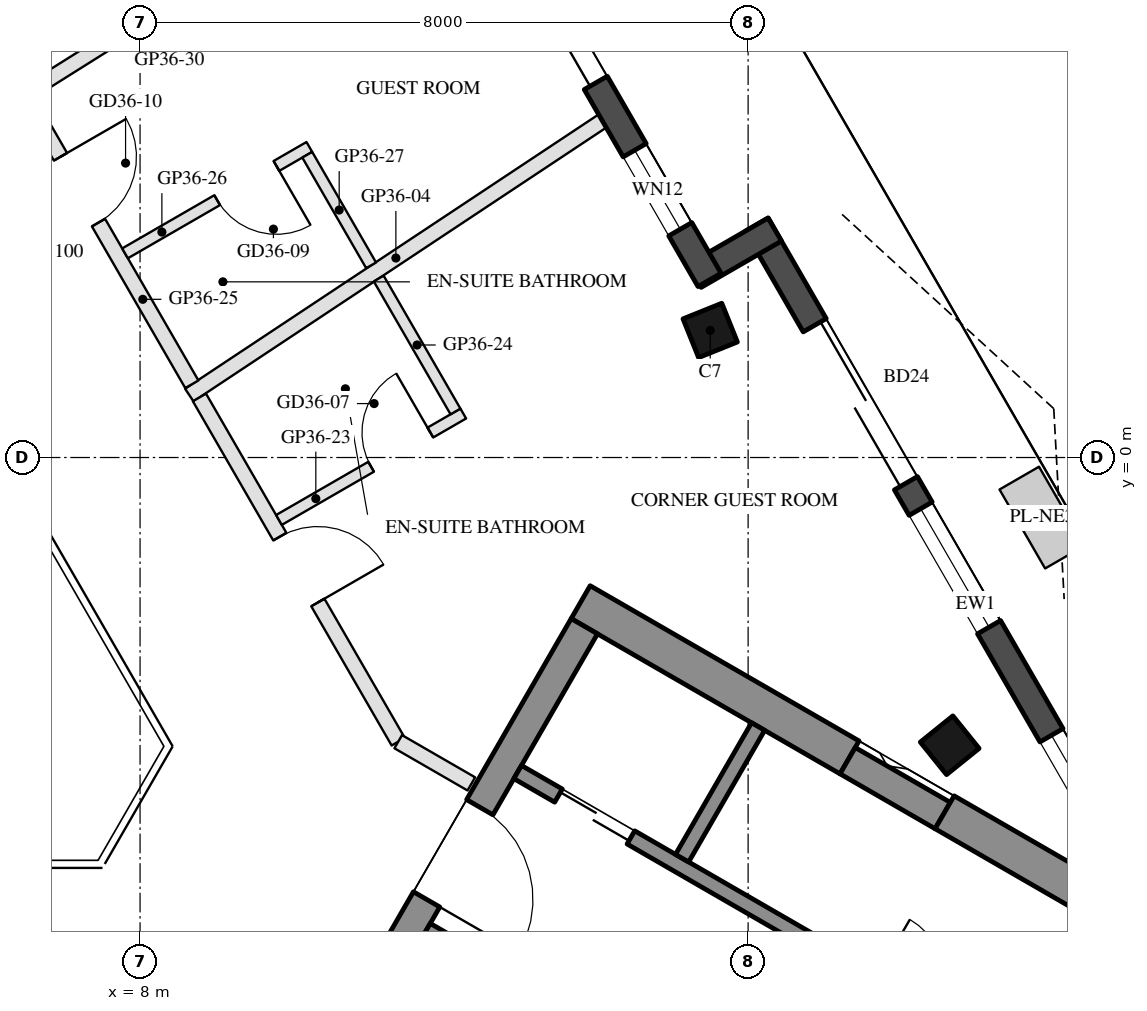
"""IFC4 building model, lengths in metres.
Left out: names, types, materials, properties, quantities, classifications, styles, units other than length and angle.
Written with IfcOpenShell. Run it as: python <this file> out.ifc"""

import sys

from ifc_helpers import new_model, si_unit, direction, frame, frame_2d, origin, origin_2d, place, context, subcontext, project, spatial, rectangle, hollow_rectangle, extrude, boolean, halfspace, element, fill, save


model = new_model("IFC4")
c1 = context("Model", 3, precision=1e-05, world=origin(), true_north=direction((0.0, 1.0)))
c2 = subcontext(c1, "Body", "Model", "MODEL_VIEW")
j1 = project(units=[si_unit("LENGTHUNIT", "METRE"), si_unit("PLANEANGLEUNIT", "RADIAN")], contexts=[c1])
p1 = place(None, origin())
s1 = spatial("IfcSite", under=j1, at=p1, CompositionType="ELEMENT")
p2 = place(p1, origin())
s2 = spatial("IfcBuilding", under=s1, at=p2, CompositionType="ELEMENT")
p3 = place(p2, frame((0.0, 0.0, 328.1)))
s3 = spatial("IfcBuildingStorey", under=s2, at=p3, CompositionType="ELEMENT", Elevation=328.1)
p4 = place(p3, frame((18.652, -3.786, 0.0), z_axis=(-0.190735837279, 0.02958801006, 0.981195388309), x_axis=(0.488607938484, -0.864067297741, 0.121037132421)))
e1 = element("IfcColumn", 1, at=p4, inside=s3, PredefinedType="COLUMN", context=c2, shape_type="SweptSolid", body=[
    boolean("DIFFERENCE", boolean("DIFFERENCE", extrude(hollow_rectangle(XDim=0.55, YDim=0.55, WallThickness=0.025, at=origin_2d()), origin(), (0.0, 0.0, 1.0), 3.771), halfspace(frame((0.0, 0.0, 0.04), z_axis=(0.0, 0.0, 1.0), x_axis=(1.0, 0.0, 0.0)), True)), halfspace(frame((0.0, 0.0, 3.753), z_axis=(0.0, 0.0, 1.0), x_axis=(1.0, 0.0, 0.0)), False)),
])
p5 = place(p3, frame((15.501, 1.672, 0.0), z_axis=(-0.161451925123, -0.022915757114, 0.986614485982), x_axis=(0.495072298274, -0.866715969634, 0.060883885081)))
e2 = element("IfcColumn", 2, at=p5, inside=s3, PredefinedType="COLUMN", context=c2, shape_type="SweptSolid", body=[
    boolean("DIFFERENCE", boolean("DIFFERENCE", extrude(hollow_rectangle(XDim=0.55, YDim=0.55, WallThickness=0.025, at=origin_2d()), origin(), (0.0, 0.0, 1.0), 3.75), halfspace(frame((0.0, 0.0, 0.034), z_axis=(0.0, 0.0, 1.0), x_axis=(1.0, 0.0, 0.0)), True)), halfspace(frame((0.0, 0.0, 3.735), z_axis=(0.0, 0.0, 1.0), x_axis=(1.0, 0.0, 0.0)), False)),
])
p6 = place(p3, frame((20.916, -5.257, 0.0), z_axis=(0.0, 0.0, 1.0), x_axis=(-0.500022310942, 0.866012522173, 0.0)))
e3 = element("IfcWall", 3, at=p6, inside=s3, PredefinedType="SOLIDWALL", context=c2, shape_type="SweptSolid", body=[
    extrude(rectangle(XDim=9.608, YDim=0.35, at=frame_2d((4.804, 0.0))), origin(), (0.0, 0.0, 1.0), 3.45),
])
p7 = place(p6, frame((0.45, 0.0, 0.3)))
e4 = element("IfcOpeningElement", 4, at=p7, cuts=e3, PredefinedType="OPENING", context=c2, shape_type="SweptSolid", body=[
    extrude(rectangle(XDim=1.4, YDim=2.65, at=frame_2d((0.7, 1.325))), frame((0.0, 0.185, 0.0), z_axis=(0.0, -1.0, 0.0), x_axis=(1.0, 0.0, 0.0)), (0.0, 0.0, 1.0), 0.37),
])
p8 = place(p6, frame((5.68, 0.0, 0.0)))
e5 = element("IfcOpeningElement", 5, at=p8, cuts=e3, PredefinedType="OPENING", context=c2, shape_type="SweptSolid", body=[
    extrude(rectangle(XDim=2.4, YDim=2.4, at=frame_2d((1.2, 1.2))), frame((0.0, 0.185, 0.0), z_axis=(0.0, -1.0, 0.0), x_axis=(1.0, 0.0, 0.0)), (0.0, 0.0, 1.0), 0.37),
])
p9 = place(p6, frame((3.492, 0.0, 0.3)))
e6 = element("IfcOpeningElement", 6, at=p9, cuts=e3, PredefinedType="OPENING", context=c2, shape_type="SweptSolid", body=[
    extrude(rectangle(XDim=1.8, YDim=2.65, at=frame_2d((0.9, 1.325))), frame((0.0, 0.185, 0.0), z_axis=(0.0, -1.0, 0.0), x_axis=(1.0, 0.0, 0.0)), (0.0, 0.0, 1.0), 0.37),
])
p10 = place(p3, frame((16.351, 3.0, 0.0), z_axis=(0.0, 0.0, 1.0), x_axis=(-0.866005645448, -0.500034220881, 0.0)))
e7 = element("IfcWall", 7, at=p10, inside=s3, PredefinedType="SOLIDWALL", context=c2, shape_type="SweptSolid", body=[
    extrude(rectangle(XDim=1.22, YDim=0.35, at=frame_2d((0.61, 0.0))), origin(), (0.0, 0.0, 1.0), 3.45),
])
p11 = place(p3, frame((15.492, 2.337, 0.0), z_axis=(0.0, 0.0, 1.0), x_axis=(-0.499999159329, 0.866025889145, 0.0)))
e8 = element("IfcWall", 8, at=p11, inside=s3, PredefinedType="SOLIDWALL", context=c2, shape_type="SweptSolid", body=[
    extrude(rectangle(XDim=5.143, YDim=0.35, at=frame_2d((2.571, 0.0))), origin(), (0.0, 0.0, 1.0), 3.45),
])
p12 = place(p11, frame((0.77, 0.0, 0.3)))
e9 = element("IfcOpeningElement", 9, at=p12, cuts=e8, PredefinedType="OPENING", context=c2, shape_type="SweptSolid", body=[
    extrude(rectangle(XDim=1.2, YDim=2.65, at=frame_2d((0.6, 1.325))), frame((0.0, 0.185, 0.0), z_axis=(0.0, -1.0, 0.0), x_axis=(1.0, 0.0, 0.0)), (0.0, 0.0, 1.0), 0.37),
])
p13 = place(p11, frame((2.993, 0.0, 0.0)))
e10 = element("IfcOpeningElement", 10, at=p13, cuts=e8, PredefinedType="OPENING", context=c2, shape_type="SweptSolid", body=[
    extrude(rectangle(XDim=1.8, YDim=2.4, at=frame_2d((0.9, 1.2))), frame((0.0, 0.185, 0.0), z_axis=(0.0, -1.0, 0.0), x_axis=(1.0, 0.0, 0.0)), (0.0, 0.0, 1.0), 0.37),
])
p14 = place(p3, frame((13.797, -1.903, 0.0), z_axis=(0.0, 0.0, 1.0), x_axis=(0.866020367552, -0.500008722908, 0.0)))
e11 = element("IfcWall", 11, at=p14, inside=s3, PredefinedType="SHEAR", context=c2, shape_type="SweptSolid", body=[
    extrude(rectangle(XDim=4.085, YDim=0.5, at=frame_2d((2.042, 0.0))), origin(), (0.0, 0.0, 1.0), 3.45),
])
p15 = place(p3, frame((17.309, -3.989, 0.0), z_axis=(0.0, 0.0, 1.0), x_axis=(0.866092727722, -0.499883373386, 0.0)))
e12 = element("IfcWall", 12, at=p15, inside=s3, PredefinedType="SHEAR", context=c2, shape_type="SweptSolid", body=[
    extrude(rectangle(XDim=1.445, YDim=0.4, at=frame_2d((0.722, 0.0))), origin(), (0.0, 0.0, 1.0), 3.45),
])
p16 = place(p3, frame((18.585, -4.668, 0.0), z_axis=(0.0, 0.0, 1.0), x_axis=(0.866034122891, -0.49998489776, 0.0)))
e13 = element("IfcWall", 13, at=p16, inside=s3, PredefinedType="SHEAR", context=c2, shape_type="SweptSolid", body=[
    extrude(rectangle(XDim=2.738, YDim=0.5, at=frame_2d((1.369, 0.0))), origin(), (0.0, 0.0, 1.0), 3.45),
])
p17 = place(p3, frame((8.845, -10.88, 0.0), z_axis=(0.0, 0.0, 1.0), x_axis=(0.500004234368, 0.866022959057, 0.0)))
e14 = element("IfcWall", 14, at=p17, inside=s3, PredefinedType="SHEAR", context=c2, shape_type="SweptSolid", body=[
    extrude(rectangle(XDim=10.0, YDim=0.4, at=frame_2d((5.0, 0.0))), origin(), (0.0, 0.0, 1.0), 3.45),
])
p18 = place(p17, frame((3.55, 0.0, 0.0)))
e15 = element("IfcOpeningElement", 15, at=p18, cuts=e14, PredefinedType="OPENING", context=c2, shape_type="SweptSolid", body=[
    extrude(rectangle(XDim=1.1, YDim=2.1, at=frame_2d((0.55, 1.05))), frame((0.0, 0.21, 0.0), z_axis=(0.0, -1.0, 0.0), x_axis=(1.0, 0.0, 0.0)), (0.0, 0.0, 1.0), 0.42),
])
p19 = place(p17, frame((5.85, 0.0, 0.0)))
e16 = element("IfcOpeningElement", 16, at=p19, cuts=e14, PredefinedType="OPENING", context=c2, shape_type="SweptSolid", body=[
    extrude(rectangle(XDim=1.4, YDim=2.1, at=frame_2d((0.7, 1.05))), frame((0.0, 0.21, 0.0), z_axis=(0.0, -1.0, 0.0), x_axis=(1.0, 0.0, 0.0)), (0.0, 0.0, 1.0), 0.42),
])
p20 = place(p3, frame((11.768, -6.217, 0.0), z_axis=(0.0, 0.0, 1.0), x_axis=(0.866050077142, -0.499957262057, 0.0)))
e17 = element("IfcWall", 17, at=p20, inside=s3, PredefinedType="SHEAR", context=c2, shape_type="SweptSolid", body=[
    extrude(rectangle(XDim=2.4, YDim=0.2, at=frame_2d((1.2, 0.0))), origin(), (0.0, 0.0, 1.0), 3.45),
])
p21 = place(p3, frame((12.968, -4.138, 0.0), z_axis=(0.0, 0.0, 1.0), x_axis=(0.866022923061, -0.500004296715, 0.0)))
e18 = element("IfcWall", 18, at=p21, inside=s3, PredefinedType="SHEAR", context=c2, shape_type="SweptSolid", body=[
    extrude(rectangle(XDim=9.273, YDim=0.2, at=frame_2d((4.636, 0.0))), origin(), (0.0, 0.0, 1.0), 3.45),
])
p22 = place(p21, frame((0.62, 0.0, 0.0)))
e19 = element("IfcOpeningElement", 19, at=p22, cuts=e18, PredefinedType="OPENING", context=c2, shape_type="SweptSolid", body=[
    extrude(rectangle(XDim=1.1, YDim=2.1, at=frame_2d((0.55, 1.05))), frame((0.0, 0.11, 0.0), z_axis=(0.0, -1.0, 0.0), x_axis=(1.0, 0.0, 0.0)), (0.0, 0.0, 1.0), 0.22),
])
p23 = place(p21, frame((5.439, 0.0, 0.0)))
e20 = element("IfcOpeningElement", 20, at=p23, cuts=e18, PredefinedType="OPENING", context=c2, shape_type="SweptSolid", body=[
    extrude(rectangle(XDim=0.9, YDim=2.1, at=frame_2d((0.45, 1.05))), frame((0.0, 0.11, 0.0), z_axis=(0.0, -1.0, 0.0), x_axis=(1.0, 0.0, 0.0)), (0.0, 0.0, 1.0), 0.22),
])
p24 = place(p3, frame((15.131, -5.272, 0.0), z_axis=(0.0, 0.0, 1.0), x_axis=(0.499972520799, 0.866041268327, 0.0)))
e21 = element("IfcWall", 21, at=p24, inside=s3, PredefinedType="SHEAR", context=c2, shape_type="SweptSolid", body=[
    extrude(rectangle(XDim=2.0, YDim=0.2, at=frame_2d((1.0, 0.0))), origin(), (0.0, 0.0, 1.0), 3.45),
])
p25 = place(p3, frame((14.083, 4.427, 0.0), z_axis=(0.0, 0.0, 1.0), x_axis=(-0.833314888817, -0.55279860354, 0.0)))
e22 = element("IfcWall", 22, at=p25, inside=s3, PredefinedType="PARTITIONING", context=c2, shape_type="SweptSolid", body=[
    extrude(rectangle(XDim=6.523, YDim=0.2, at=frame_2d((3.262, 0.0))), origin(), (0.0, 0.0, 1.0), 2.75),
])
p26 = place(p3, frame((12.674, 8.668, 0.0), z_axis=(0.0, 0.0, 1.0), x_axis=(-0.846714096045, -0.532048155301, 0.0)))
e23 = element("IfcWall", 23, at=p26, inside=s3, PredefinedType="PARTITIONING", context=c2, shape_type="SweptSolid", body=[
    extrude(rectangle(XDim=7.416, YDim=0.2, at=frame_2d((3.708, 0.0))), origin(), (0.0, 0.0, 1.0), 3.05),
])
p27 = place(p3, frame((8.781, 0.79, 0.0), z_axis=(0.0, 0.0, 1.0), x_axis=(0.499999923186, -0.866025448133, 0.0)))
e24 = element("IfcWall", 24, at=p27, inside=s3, PredefinedType="PARTITIONING", context=c2, shape_type="SweptSolid", body=[
    extrude(rectangle(XDim=5.23, YDim=0.2, at=frame_2d((2.615, 0.0))), origin(), (0.0, 0.0, 1.0), 3.05),
])
p28 = place(p27, frame((2.115, 0.0, 0.0)))
e25 = element("IfcOpeningElement", 25, at=p28, cuts=e24, PredefinedType="OPENING", context=c2, shape_type="SweptSolid", body=[
    extrude(rectangle(XDim=1.0, YDim=2.1, at=frame_2d((0.5, 1.05))), frame((0.0, 0.11, 0.0), z_axis=(0.0, -1.0, 0.0), x_axis=(1.0, 0.0, 0.0)), (0.0, 0.0, 1.0), 0.22),
])
p29 = place(p3, frame((11.396, -3.739, 0.0), z_axis=(0.0, 0.0, 1.0), x_axis=(0.866002566612, -0.500039553057, 0.0)))
e26 = element("IfcWall", 26, at=p29, inside=s3, PredefinedType="PARTITIONING", context=c2, shape_type="SweptSolid", body=[
    extrude(rectangle(XDim=1.111, YDim=0.2, at=frame_2d((0.555, 0.0))), origin(), (0.0, 0.0, 1.0), 3.45),
])
p30 = place(p3, frame((9.827, -0.822, 0.0), z_axis=(0.0, 0.0, 1.0), x_axis=(0.866034573852, 0.49998411664, 0.0)))
e27 = element("IfcWall", 27, at=p30, inside=s3, PredefinedType="PARTITIONING", context=c2, shape_type="SweptSolid", body=[
    extrude(rectangle(XDim=2.8, YDim=0.15, at=frame_2d((1.4, 0.0))), origin(), (0.0, 0.0, 1.0), 3.45),
])
p31 = place(p30, frame((1.4, 0.0, 0.0)))
e28 = element("IfcOpeningElement", 28, at=p31, cuts=e27, PredefinedType="OPENING", context=c2, shape_type="SweptSolid", body=[
    extrude(rectangle(XDim=0.9, YDim=2.1, at=frame_2d((0.45, 1.05))), frame((0.0, 0.085, 0.0), z_axis=(0.0, -1.0, 0.0), x_axis=(1.0, 0.0, 0.0)), (0.0, 0.0, 1.0), 0.17),
])
p32 = place(p3, frame((12.15, 0.606, 0.0), z_axis=(0.0, 0.0, 1.0), x_axis=(-0.500078207394, 0.865980246016, 0.0)))
e29 = element("IfcWall", 29, at=p32, inside=s3, PredefinedType="PARTITIONING", context=c2, shape_type="SweptSolid", body=[
    extrude(rectangle(XDim=2.02, YDim=0.15, at=frame_2d((1.01, 0.0))), origin(), (0.0, 0.0, 1.0), 3.45),
])
p33 = place(p3, frame((6.53, 4.689, 0.0), z_axis=(0.0, 0.0, 1.0), x_axis=(0.500002449018, -0.866023989838, 0.0)))
e30 = element("IfcWall", 30, at=p33, inside=s3, PredefinedType="PARTITIONING", context=c2, shape_type="SweptSolid", body=[
    extrude(rectangle(XDim=4.302, YDim=0.2, at=frame_2d((2.151, 0.0))), origin(), (0.0, 0.0, 1.0), 2.75),
])
p34 = place(p33, frame((0.846, 0.0, 0.0)))
e31 = element("IfcOpeningElement", 31, at=p34, cuts=e30, PredefinedType="OPENING", context=c2, shape_type="SweptSolid", body=[
    extrude(rectangle(XDim=1.0, YDim=2.1, at=frame_2d((0.5, 1.05))), frame((0.0, 0.11, 0.0), z_axis=(0.0, -1.0, 0.0), x_axis=(1.0, 0.0, 0.0)), (0.0, 0.0, 1.0), 0.22),
])
p35 = place(p3, frame((10.227, 4.086, 0.0), z_axis=(0.0, 0.0, 1.0), x_axis=(-0.866034573852, -0.49998411664, 0.0)))
e32 = element("IfcWall", 32, at=p35, inside=s3, PredefinedType="PARTITIONING", context=c2, shape_type="SweptSolid", body=[
    extrude(rectangle(XDim=2.8, YDim=0.15, at=frame_2d((1.4, 0.0))), origin(), (0.0, 0.0, 1.0), 3.45),
])
p36 = place(p35, frame((0.5, 0.0, 0.0)))
e33 = element("IfcOpeningElement", 33, at=p36, cuts=e32, PredefinedType="OPENING", context=c2, shape_type="SweptSolid", body=[
    extrude(rectangle(XDim=0.9, YDim=2.1, at=frame_2d((0.45, 1.05))), frame((0.0, 0.085, 0.0), z_axis=(0.0, -1.0, 0.0), x_axis=(1.0, 0.0, 0.0)), (0.0, 0.0, 1.0), 0.17),
])
p37 = place(p3, frame((11.04, 2.529, 0.0), z_axis=(0.0, 0.0, 1.0), x_axis=(-0.499999171277, 0.866025882247, 0.0)))
e34 = element("IfcWall", 34, at=p37, inside=s3, PredefinedType="PARTITIONING", context=c2, shape_type="SweptSolid", body=[
    extrude(rectangle(XDim=1.68, YDim=0.15, at=frame_2d((0.84, 0.0))), origin(), (0.0, 0.0, 1.0), 2.75),
])
p38 = place(p7, origin())
e35 = element("IfcWindow", 35, at=p38, inside=s3, PartitioningType="SINGLE_PANEL", PredefinedType="WINDOW", context=c2, shape_type="SweptSolid", body=[
    extrude(rectangle(XDim=1.4, YDim=2.65, at=frame_2d((0.7, 1.325))), frame((0.0, 0.03, 0.0), z_axis=(0.0, -1.0, 0.0), x_axis=(1.0, 0.0, 0.0)), (0.0, 0.0, 1.0), 0.06),
])
fill(e4, e35)
p39 = place(p8, frame((2.4, 0.0, 0.0), z_axis=(0.0, 0.0, 1.0), x_axis=(-1.0, 0.0, 0.0)))
e36 = element("IfcDoor", 36, at=p39, inside=s3, OperationType="SLIDING_TO_LEFT", PredefinedType="DOOR", context=c2, shape_type="SweptSolid", body=[
    extrude(rectangle(XDim=2.4, YDim=2.4, at=frame_2d((1.2, 1.2))), frame((0.0, 0.025, 0.0), z_axis=(0.0, -1.0, 0.0), x_axis=(1.0, 0.0, 0.0)), (0.0, 0.0, 1.0), 0.05),
])
fill(e5, e36)
p40 = place(p9, origin())
e37 = element("IfcWindow", 37, at=p40, inside=s3, PartitioningType="SINGLE_PANEL", PredefinedType="WINDOW", context=c2, shape_type="SweptSolid", body=[
    extrude(rectangle(XDim=1.8, YDim=2.65, at=frame_2d((0.9, 1.325))), frame((0.0, 0.03, 0.0), z_axis=(0.0, -1.0, 0.0), x_axis=(1.0, 0.0, 0.0)), (0.0, 0.0, 1.0), 0.06),
])
fill(e6, e37)
p41 = place(p12, origin())
e38 = element("IfcWindow", 38, at=p41, inside=s3, PartitioningType="SINGLE_PANEL", PredefinedType="WINDOW", context=c2, shape_type="SweptSolid", body=[
    extrude(rectangle(XDim=1.2, YDim=2.65, at=frame_2d((0.6, 1.325))), frame((0.0, 0.03, 0.0), z_axis=(0.0, -1.0, 0.0), x_axis=(1.0, 0.0, 0.0)), (0.0, 0.0, 1.0), 0.06),
])
fill(e9, e38)
p42 = place(p13, frame((1.8, 0.0, 0.0), z_axis=(0.0, 0.0, 1.0), x_axis=(-1.0, 0.0, 0.0)))
e39 = element("IfcDoor", 39, at=p42, inside=s3, OperationType="SLIDING_TO_LEFT", PredefinedType="DOOR", context=c2, shape_type="SweptSolid", body=[
    extrude(rectangle(XDim=1.8, YDim=2.4, at=frame_2d((0.9, 1.2))), frame((0.0, 0.025, 0.0), z_axis=(0.0, -1.0, 0.0), x_axis=(1.0, 0.0, 0.0)), (0.0, 0.0, 1.0), 0.05),
])
fill(e10, e39)
p43 = place(p22, origin())
e40 = element("IfcDoor", 40, at=p43, inside=s3, OperationType="DOUBLE_DOOR_SLIDING", PredefinedType="DOOR", context=c2, shape_type="SweptSolid", body=[
    extrude(rectangle(XDim=1.1, YDim=2.1, at=frame_2d((0.55, 1.05))), frame((0.0, 0.025, 0.0), z_axis=(0.0, -1.0, 0.0), x_axis=(1.0, 0.0, 0.0)), (0.0, 0.0, 1.0), 0.05),
])
fill(e19, e40)
p44 = place(p19, frame((1.4, 0.0, 0.0), z_axis=(0.0, 0.0, 1.0), x_axis=(-1.0, 0.0, 0.0)))
e41 = element("IfcDoor", 41, at=p44, inside=s3, OperationType="DOUBLE_DOOR_SINGLE_SWING", PredefinedType="DOOR", context=c2, shape_type="SweptSolid", body=[
    extrude(rectangle(XDim=1.4, YDim=2.1, at=frame_2d((0.7, 1.05))), frame((0.0, 0.025, 0.0), z_axis=(0.0, -1.0, 0.0), x_axis=(1.0, 0.0, 0.0)), (0.0, 0.0, 1.0), 0.05),
])
fill(e16, e41)
p45 = place(p31, origin())
e42 = element("IfcDoor", 42, at=p45, inside=s3, OperationType="SINGLE_SWING_RIGHT", PredefinedType="DOOR", context=c2, shape_type="SweptSolid", body=[
    extrude(rectangle(XDim=0.9, YDim=2.1, at=frame_2d((0.45, 1.05))), frame((0.0, 0.025, 0.0), z_axis=(0.0, -1.0, 0.0), x_axis=(1.0, 0.0, 0.0)), (0.0, 0.0, 1.0), 0.05),
])
fill(e28, e42)
p46 = place(p28, origin())
e43 = element("IfcDoor", 43, at=p46, inside=s3, OperationType="SINGLE_SWING_RIGHT", PredefinedType="DOOR", context=c2, shape_type="SweptSolid", body=[
    extrude(rectangle(XDim=1.0, YDim=2.1, at=frame_2d((0.5, 1.05))), frame((0.0, 0.025, 0.0), z_axis=(0.0, -1.0, 0.0), x_axis=(1.0, 0.0, 0.0)), (0.0, 0.0, 1.0), 0.05),
])
fill(e25, e43)
p47 = place(p36, origin())
e44 = element("IfcDoor", 44, at=p47, inside=s3, OperationType="SINGLE_SWING_LEFT", PredefinedType="DOOR", context=c2, shape_type="SweptSolid", body=[
    extrude(rectangle(XDim=0.9, YDim=2.1, at=frame_2d((0.45, 1.05))), frame((0.0, 0.025, 0.0), z_axis=(0.0, -1.0, 0.0), x_axis=(1.0, 0.0, 0.0)), (0.0, 0.0, 1.0), 0.05),
])
fill(e33, e44)
p48 = place(p34, origin())
e45 = element("IfcDoor", 45, at=p48, inside=s3, OperationType="SINGLE_SWING_LEFT", PredefinedType="DOOR", context=c2, shape_type="SweptSolid", body=[
    extrude(rectangle(XDim=1.0, YDim=2.1, at=frame_2d((0.5, 1.05))), frame((0.0, 0.025, 0.0), z_axis=(0.0, -1.0, 0.0), x_axis=(1.0, 0.0, 0.0)), (0.0, 0.0, 1.0), 0.05),
])
fill(e31, e45)
save(model, sys.argv[1])
